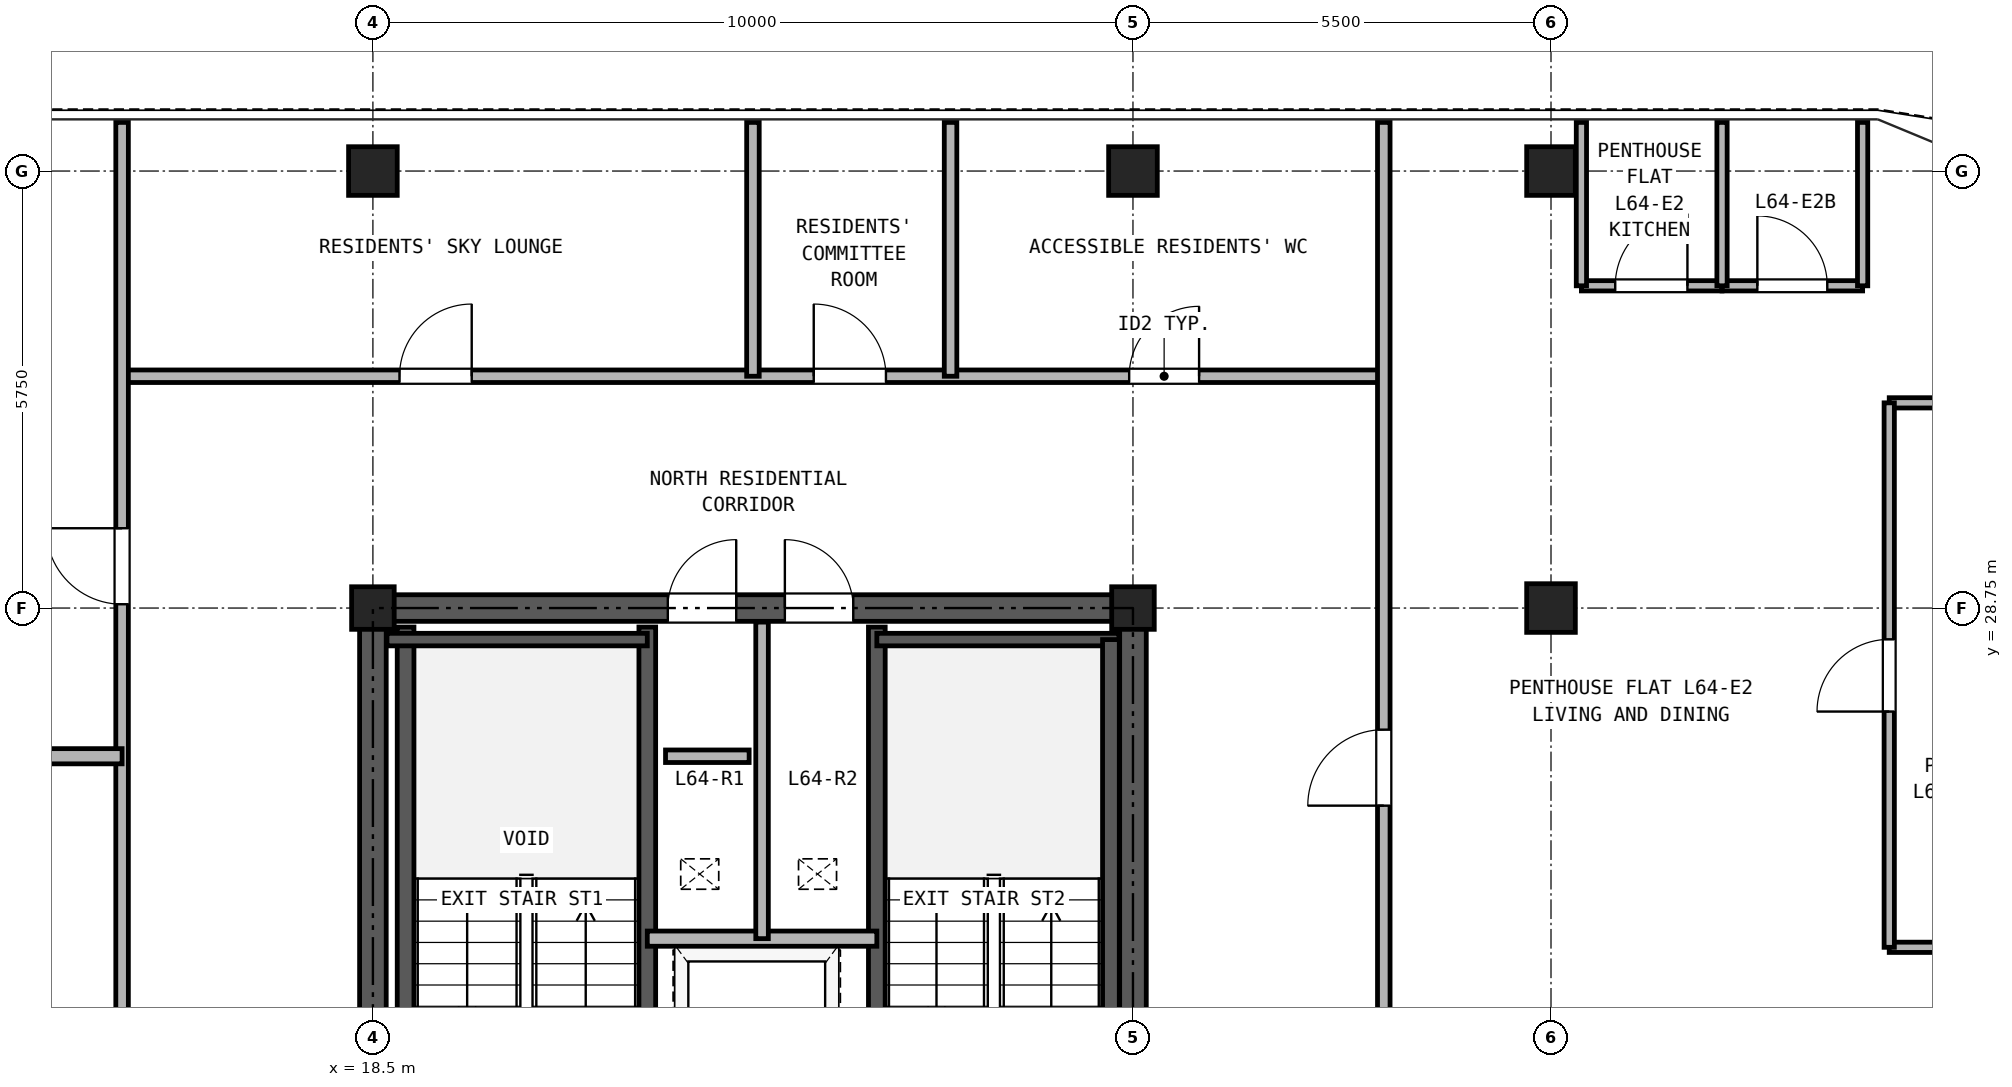
"""IFC4 building model, lengths in metres.
Left out: names, types, materials, properties, quantities, classifications, styles, units other than length and angle.
Written with IfcOpenShell. Run it as: python <this file> out.ifc"""

import sys

from ifc_helpers import new_model, si_unit, direction, frame, frame_2d, origin, origin_2d, place, context, subcontext, project, spatial, rectangle, hollow_rectangle, extrude, source, transform, mapped, element, fill, save


model = new_model("IFC4")
c1 = context("Model", 3, precision=1e-05, world=origin(), true_north=direction((0.0, 1.0)))
c2 = subcontext(c1, "Body", "Model", "MODEL_VIEW")
j1 = project(units=[si_unit("LENGTHUNIT", "METRE"), si_unit("PLANEANGLEUNIT", "RADIAN")], contexts=[c1])
p1 = place(None, origin())
s1 = spatial("IfcSite", under=j1, at=p1, CompositionType="ELEMENT")
p2 = place(p1, origin())
s2 = spatial("IfcBuilding", under=s1, at=p2, CompositionType="ELEMENT")
p3 = place(p2, frame((0.0, 0.0, 226.5)))
s3 = spatial("IfcBuildingStorey", under=s2, at=p3, CompositionType="ELEMENT", Elevation=226.5)
m1 = source(origin(), c2, "Body", "SweptSolid", [
    extrude(hollow_rectangle(XDim=0.64, YDim=0.64, WallThickness=0.035, at=origin_2d()), origin(), (0.0, 0.0, 1.0), 2.98),
])
for number, where, z_axis, x_axis in (
    (1, (18.5, 34.5, 0.0), (0.0, 0.0, 1.0), (1.0, 0.0, 0.0)),
    (2, (28.5, 34.5, 0.0), (0.0, 0.0, 1.0), (1.0, 0.0, 0.0)),
    (3, (34.0, 34.5, 0.0), (0.0, 0.0, 1.0), (1.0, 0.0, 0.0)),
):
    element("IfcColumn", number, at=place(p3, frame(where, z_axis=z_axis, x_axis=x_axis)), inside=s3, PredefinedType="COLUMN", context=c2, shape_type="MappedRepresentation", body=[
        mapped(m1, transform((0.0, 0.0, 0.0), x_axis=(1.0, 0.0, 0.0), y_axis=(0.0, 1.0, 0.0), z_axis=(0.0, 0.0, 1.0), scale=1.0)),
    ])
m2 = source(origin(), c2, "Body", "SweptSolid", [
    extrude(hollow_rectangle(XDim=0.56, YDim=0.56, WallThickness=0.03, at=origin_2d()), origin(), (0.0, 0.0, 1.0), 2.98),
])
for number, where, z_axis, x_axis in (
    (4, (18.5, 28.75, 0.0), (0.0, 0.0, 1.0), (1.0, 0.0, 0.0)),
    (5, (28.5, 28.75, 0.0), (0.0, 0.0, 1.0), (1.0, 0.0, 0.0)),
):
    element("IfcColumn", number, at=place(p3, frame(where, z_axis=z_axis, x_axis=x_axis)), inside=s3, PredefinedType="COLUMN", context=c2, shape_type="MappedRepresentation", body=[
        mapped(m2, transform((0.0, 0.0, 0.0), x_axis=(1.0, 0.0, 0.0), y_axis=(0.0, 1.0, 0.0), z_axis=(0.0, 0.0, 1.0), scale=1.0)),
    ])
p4 = place(p3, frame((34.0, 28.75, 0.0), z_axis=(0.0, 0.0, 1.0), x_axis=(1.0, 0.0, 0.0)))
e6 = element("IfcColumn", 6, at=p4, inside=s3, PredefinedType="COLUMN", context=c2, shape_type="MappedRepresentation", body=[
    mapped(m1, transform((0.0, 0.0, 0.0), x_axis=(1.0, 0.0, 0.0), y_axis=(0.0, 1.0, 0.0), z_axis=(0.0, 0.0, 1.0), scale=1.0)),
])
p5 = place(p3, frame((18.325, 28.75, 0.0), z_axis=(0.0, 0.0, 1.0), x_axis=(1.0, 0.0, 0.0)))
e7 = element("IfcWall", 7, at=p5, inside=s3, PredefinedType="SHEAR", context=c2, shape_type="SweptSolid", body=[
    extrude(rectangle(XDim=10.35, YDim=0.35, at=frame_2d((5.175, 0.0))), origin(), (0.0, 0.0, 1.0), 2.98),
])
p6 = place(p5, frame((4.055, 0.0, 0.0)))
e8 = element("IfcOpeningElement", 8, at=p6, cuts=e7, PredefinedType="OPENING", context=c2, shape_type="SweptSolid", body=[
    extrude(rectangle(XDim=0.9, YDim=2.05, at=frame_2d((0.45, 1.025))), frame((0.0, 0.185, 0.0), z_axis=(0.0, -1.0, 0.0), x_axis=(1.0, 0.0, 0.0)), (0.0, 0.0, 1.0), 0.37),
])
p7 = place(p5, frame((5.595, 0.0, 0.0)))
e9 = element("IfcOpeningElement", 9, at=p7, cuts=e7, PredefinedType="OPENING", context=c2, shape_type="SweptSolid", body=[
    extrude(rectangle(XDim=0.9, YDim=2.05, at=frame_2d((0.45, 1.025))), frame((0.0, 0.185, 0.0), z_axis=(0.0, -1.0, 0.0), x_axis=(1.0, 0.0, 0.0)), (0.0, 0.0, 1.0), 0.37),
])
p8 = place(p3, frame((18.5, 11.675, 0.0), z_axis=(0.0, 0.0, 1.0), x_axis=(0.0, 1.0, 0.0)))
e10 = element("IfcWall", 10, at=p8, inside=s3, PredefinedType="SHEAR", context=c2, shape_type="SweptSolid", body=[
    extrude(rectangle(XDim=16.9, YDim=0.35, at=frame_2d((8.45, 0.0))), origin(), (0.0, 0.0, 1.0), 2.98),
])
p9 = place(p8, frame((7.475, 0.0, 0.0)))
e11 = element("IfcOpeningElement", 11, at=p9, cuts=e10, PredefinedType="OPENING", context=c2, shape_type="SweptSolid", body=[
    extrude(rectangle(XDim=1.15, YDim=2.2, at=frame_2d((0.575, 1.1))), frame((0.0, 0.185, 0.0), z_axis=(0.0, -1.0, 0.0), x_axis=(1.0, 0.0, 0.0)), (0.0, 0.0, 1.0), 0.37),
])
p10 = place(p3, frame((28.5, 11.675, 0.0), z_axis=(0.0, 0.0, 1.0), x_axis=(0.0, 1.0, 0.0)))
e12 = element("IfcWall", 12, at=p10, inside=s3, PredefinedType="SHEAR", context=c2, shape_type="SweptSolid", body=[
    extrude(rectangle(XDim=16.9, YDim=0.35, at=frame_2d((8.45, 0.0))), origin(), (0.0, 0.0, 1.0), 2.98),
])
p11 = place(p10, frame((7.475, 0.0, 0.0)))
e13 = element("IfcOpeningElement", 13, at=p11, cuts=e12, PredefinedType="OPENING", context=c2, shape_type="SweptSolid", body=[
    extrude(rectangle(XDim=1.15, YDim=2.2, at=frame_2d((0.575, 1.1))), frame((0.0, 0.185, 0.0), z_axis=(0.0, -1.0, 0.0), x_axis=(1.0, 0.0, 0.0)), (0.0, 0.0, 1.0), 0.37),
])
for number, where, z_axis, x_axis in (
    (14, (18.93, 21.39, 0.0), (0.0, 0.0, 1.0), (0.0, 1.0, 0.0)),
    (15, (22.11, 21.39, 0.0), (0.0, 0.0, 1.0), (0.0, 1.0, 0.0)),
    (16, (25.13, 21.39, 0.0), (0.0, 0.0, 1.0), (0.0, 1.0, 0.0)),
):
    element("IfcWall", number, at=place(p3, frame(where, z_axis=z_axis, x_axis=x_axis)), inside=s3, PredefinedType="SOLIDWALL", context=c2, shape_type="SweptSolid", body=[
        extrude(rectangle(XDim=7.11, YDim=0.22, at=frame_2d((3.555, 0.0))), origin(), (0.0, 0.0, 1.0), 2.98),
    ])
p12 = place(p3, frame((18.685, 28.335, 0.0), z_axis=(0.0, 0.0, 1.0), x_axis=(1.0, 0.0, 0.0)))
e17 = element("IfcWall", 17, at=p12, inside=s3, PredefinedType="PARTITIONING", context=c2, shape_type="SweptSolid", body=[
    extrude(rectangle(XDim=3.425, YDim=0.165, at=frame_2d((1.712, 0.0))), origin(), (0.0, 0.0, 1.0), 2.98),
])
p13 = place(p3, frame((25.13, 28.335, 0.0), z_axis=(0.0, 0.0, 1.0), x_axis=(1.0, 0.0, 0.0)))
e18 = element("IfcWall", 18, at=p13, inside=s3, PredefinedType="PARTITIONING", context=c2, shape_type="SweptSolid", body=[
    extrude(rectangle(XDim=3.185, YDim=0.165, at=frame_2d((1.593, 0.0))), origin(), (0.0, 0.0, 1.0), 2.98),
])
p14 = place(p3, frame((28.21, 21.39, 0.0), z_axis=(0.0, 0.0, 1.0), x_axis=(0.0, 1.0, 0.0)))
e19 = element("IfcWall", 19, at=p14, inside=s3, PredefinedType="SOLIDWALL", context=c2, shape_type="SweptSolid", body=[
    extrude(rectangle(XDim=6.945, YDim=0.22, at=frame_2d((3.473, 0.0))), origin(), (0.0, 0.0, 1.0), 2.98),
])
p15 = place(p3, frame((22.11, 24.4, 0.0), z_axis=(0.0, 0.0, 1.0), x_axis=(1.0, 0.0, 0.0)))
e20 = element("IfcWall", 20, at=p15, inside=s3, PredefinedType="PARTITIONING", context=c2, shape_type="SweptSolid", body=[
    extrude(rectangle(XDim=3.02, YDim=0.2, at=frame_2d((1.51, 0.0))), origin(), (0.0, 0.0, 1.0), 2.98),
])
p16 = place(p3, frame((23.62, 24.4, 0.0), z_axis=(0.0, 0.0, 1.0), x_axis=(0.0, 1.0, 0.0)))
e21 = element("IfcWall", 21, at=p16, inside=s3, PredefinedType="PARTITIONING", context=c2, shape_type="SweptSolid", body=[
    extrude(rectangle(XDim=4.165, YDim=0.165, at=frame_2d((2.083, 0.0))), origin(), (0.0, 0.0, 1.0), 2.98),
])
p17 = place(p3, frame((15.2, 31.8, 0.0), z_axis=(0.0, 0.0, 1.0), x_axis=(1.0, 0.0, 0.0)))
e22 = element("IfcWall", 22, at=p17, inside=s3, PredefinedType="PARTITIONING", context=c2, shape_type="SweptSolid", body=[
    extrude(rectangle(XDim=16.6, YDim=0.165, at=frame_2d((8.3, 0.0))), origin(), (0.0, 0.0, 1.0), 2.655),
])
p18 = place(p17, frame((3.65, 0.0, 0.0)))
e23 = element("IfcOpeningElement", 23, at=p18, cuts=e22, PredefinedType="OPENING", context=c2, shape_type="SweptSolid", body=[
    extrude(rectangle(XDim=0.95, YDim=2.15, at=frame_2d((0.475, 1.075))), frame((0.0, 0.093, 0.0), z_axis=(0.0, -1.0, 0.0), x_axis=(1.0, 0.0, 0.0)), (0.0, 0.0, 1.0), 0.185),
])
p19 = place(p17, frame((9.1, 0.0, 0.0)))
e24 = element("IfcOpeningElement", 24, at=p19, cuts=e22, PredefinedType="OPENING", context=c2, shape_type="SweptSolid", body=[
    extrude(rectangle(XDim=0.95, YDim=2.15, at=frame_2d((0.475, 1.075))), frame((0.0, 0.093, 0.0), z_axis=(0.0, -1.0, 0.0), x_axis=(1.0, 0.0, 0.0)), (0.0, 0.0, 1.0), 0.185),
])
p20 = place(p17, frame((13.25, 0.0, 0.0)))
e25 = element("IfcOpeningElement", 25, at=p20, cuts=e22, PredefinedType="OPENING", context=c2, shape_type="SweptSolid", body=[
    extrude(rectangle(XDim=0.92, YDim=2.1, at=frame_2d((0.46, 1.05))), frame((0.0, 0.093, 0.0), z_axis=(0.0, -1.0, 0.0), x_axis=(1.0, 0.0, 0.0)), (0.0, 0.0, 1.0), 0.185),
])
p21 = place(p3, frame((15.2, 10.65, 0.0), z_axis=(0.0, 0.0, 1.0), x_axis=(0.0, 1.0, 0.0)))
e26 = element("IfcWall", 26, at=p21, inside=s3, PredefinedType="PARTITIONING", context=c2, shape_type="SweptSolid", body=[
    extrude(rectangle(XDim=24.49, YDim=0.165, at=frame_2d((12.245, 0.0))), origin(), (0.0, 0.0, 1.0), 2.98),
])
p22 = place(p21, frame((3.425, 0.0, 0.0)))
e27 = element("IfcOpeningElement", 27, at=p22, cuts=e26, PredefinedType="OPENING", context=c2, shape_type="SweptSolid", body=[
    extrude(rectangle(XDim=1.0, YDim=2.15, at=frame_2d((0.5, 1.075))), frame((0.0, 0.093, 0.0), z_axis=(0.0, -1.0, 0.0), x_axis=(1.0, 0.0, 0.0)), (0.0, 0.0, 1.0), 0.185),
])
p23 = place(p21, frame((11.5, 0.0, 0.0)))
e28 = element("IfcOpeningElement", 28, at=p23, cuts=e26, PredefinedType="OPENING", context=c2, shape_type="SweptSolid", body=[
    extrude(rectangle(XDim=1.0, YDim=2.15, at=frame_2d((0.5, 1.075))), frame((0.0, 0.093, 0.0), z_axis=(0.0, -1.0, 0.0), x_axis=(1.0, 0.0, 0.0)), (0.0, 0.0, 1.0), 0.185),
])
p24 = place(p21, frame((18.15, 0.0, 0.0)))
e29 = element("IfcOpeningElement", 29, at=p24, cuts=e26, PredefinedType="OPENING", context=c2, shape_type="SweptSolid", body=[
    extrude(rectangle(XDim=1.0, YDim=2.15, at=frame_2d((0.5, 1.075))), frame((0.0, 0.093, 0.0), z_axis=(0.0, -1.0, 0.0), x_axis=(1.0, 0.0, 0.0)), (0.0, 0.0, 1.0), 0.185),
])
p25 = place(p3, frame((31.8, 10.65, 0.0), z_axis=(0.0, 0.0, 1.0), x_axis=(0.0, 1.0, 0.0)))
e30 = element("IfcWall", 30, at=p25, inside=s3, PredefinedType="PARTITIONING", context=c2, shape_type="SweptSolid", body=[
    extrude(rectangle(XDim=24.49, YDim=0.165, at=frame_2d((12.245, 0.0))), origin(), (0.0, 0.0, 1.0), 2.98),
])
p26 = place(p25, frame((4.925, 0.0, 0.0)))
e31 = element("IfcOpeningElement", 31, at=p26, cuts=e30, PredefinedType="OPENING", context=c2, shape_type="SweptSolid", body=[
    extrude(rectangle(XDim=1.0, YDim=2.15, at=frame_2d((0.5, 1.075))), frame((0.0, 0.093, 0.0), z_axis=(0.0, -1.0, 0.0), x_axis=(1.0, 0.0, 0.0)), (0.0, 0.0, 1.0), 0.185),
])
p27 = place(p25, frame((15.5, 0.0, 0.0)))
e32 = element("IfcOpeningElement", 32, at=p27, cuts=e30, PredefinedType="OPENING", context=c2, shape_type="SweptSolid", body=[
    extrude(rectangle(XDim=1.0, YDim=2.15, at=frame_2d((0.5, 1.075))), frame((0.0, 0.093, 0.0), z_axis=(0.0, -1.0, 0.0), x_axis=(1.0, 0.0, 0.0)), (0.0, 0.0, 1.0), 0.185),
])
p28 = place(p3, frame((5.36, 26.8, 0.0), z_axis=(0.0, 0.0, 1.0), x_axis=(1.0, 0.0, 0.0)))
e33 = element("IfcWall", 33, at=p28, inside=s3, PredefinedType="PARTITIONING", context=c2, shape_type="SweptSolid", body=[
    extrude(rectangle(XDim=9.84, YDim=0.2, at=frame_2d((4.92, 0.0))), origin(), (0.0, 0.0, 1.0), 2.98),
])
p29 = place(p3, frame((34.4, 32.99, 0.0), z_axis=(0.0, 0.0, 1.0), x_axis=(1.0, 0.0, 0.0)))
e34 = element("IfcWall", 34, at=p29, inside=s3, PredefinedType="PARTITIONING", context=c2, shape_type="SweptSolid", body=[
    extrude(rectangle(XDim=1.85, YDim=0.135, at=frame_2d((0.925, 0.0))), origin(), (0.0, 0.0, 1.0), 2.98),
])
p30 = place(p29, frame((0.445, 0.0, 0.0)))
e35 = element("IfcOpeningElement", 35, at=p30, cuts=e34, PredefinedType="OPENING", context=c2, shape_type="SweptSolid", body=[
    extrude(rectangle(XDim=0.95, YDim=2.15, at=frame_2d((0.475, 1.075))), frame((0.0, 0.077, 0.0), z_axis=(0.0, -1.0, 0.0), x_axis=(1.0, 0.0, 0.0)), (0.0, 0.0, 1.0), 0.155),
])
p31 = place(p3, frame((36.25, 32.99, 0.0), z_axis=(0.0, 0.0, 1.0), x_axis=(1.0, 0.0, 0.0)))
e36 = element("IfcWall", 36, at=p31, inside=s3, PredefinedType="PARTITIONING", context=c2, shape_type="SweptSolid", body=[
    extrude(rectangle(XDim=1.85, YDim=0.135, at=frame_2d((0.925, 0.0))), origin(), (0.0, 0.0, 1.0), 2.98),
])
p32 = place(p31, frame((0.465, 0.0, 0.0)))
e37 = element("IfcOpeningElement", 37, at=p32, cuts=e36, PredefinedType="OPENING", context=c2, shape_type="SweptSolid", body=[
    extrude(rectangle(XDim=0.92, YDim=2.1, at=frame_2d((0.46, 1.05))), frame((0.0, 0.077, 0.0), z_axis=(0.0, -1.0, 0.0), x_axis=(1.0, 0.0, 0.0)), (0.0, 0.0, 1.0), 0.155),
])
for number, where, z_axis, x_axis in (
    (38, (34.4, 32.99, 0.0), (0.0, 0.0, 1.0), (0.0, 1.0, 0.0)),
    (39, (36.25, 32.99, 0.0), (0.0, 0.0, 1.0), (0.0, 1.0, 0.0)),
    (40, (38.1, 32.99, 0.0), (0.0, 0.0, 1.0), (0.0, 1.0, 0.0)),
):
    element("IfcWall", number, at=place(p3, frame(where, z_axis=z_axis, x_axis=x_axis)), inside=s3, PredefinedType="PARTITIONING", context=c2, shape_type="SweptSolid", body=[
        extrude(rectangle(XDim=2.15, YDim=0.135, at=frame_2d((1.075, 0.0))), origin(), (0.0, 0.0, 1.0), 2.98),
    ])
for number, where, z_axis, x_axis in (
    (41, (38.45, 24.286, 0.0), (0.0, 0.0, 1.0), (1.0, 0.0, 0.0)),
    (42, (38.45, 31.45, 0.0), (0.0, 0.0, 1.0), (1.0, 0.0, 0.0)),
):
    element("IfcWall", number, at=place(p3, frame(where, z_axis=z_axis, x_axis=x_axis)), inside=s3, PredefinedType="PARTITIONING", context=c2, shape_type="SweptSolid", body=[
        extrude(rectangle(XDim=3.19, YDim=0.135, at=frame_2d((1.595, 0.0))), origin(), (0.0, 0.0, 1.0), 2.98),
    ])
p33 = place(p3, frame((38.45, 24.286, 0.0), z_axis=(0.0, 0.0, 1.0), x_axis=(0.0, 1.0, 0.0)))
e43 = element("IfcWall", 43, at=p33, inside=s3, PredefinedType="PARTITIONING", context=c2, shape_type="SweptSolid", body=[
    extrude(rectangle(XDim=7.164, YDim=0.135, at=frame_2d((3.582, 0.0))), origin(), (0.0, 0.0, 1.0), 2.98),
])
p34 = place(p33, frame((3.102, 0.0, 0.0)))
e44 = element("IfcOpeningElement", 44, at=p34, cuts=e43, PredefinedType="OPENING", context=c2, shape_type="SweptSolid", body=[
    extrude(rectangle(XDim=0.95, YDim=2.15, at=frame_2d((0.475, 1.075))), frame((0.0, 0.077, 0.0), z_axis=(0.0, -1.0, 0.0), x_axis=(1.0, 0.0, 0.0)), (0.0, 0.0, 1.0), 0.155),
])
for number, where, z_axis, x_axis in (
    (45, (23.5, 31.8, 0.0), (0.0, 0.0, 1.0), (0.0, 1.0, 0.0)),
    (46, (26.1, 31.8, 0.0), (0.0, 0.0, 1.0), (0.0, 1.0, 0.0)),
):
    element("IfcWall", number, at=place(p3, frame(where, z_axis=z_axis, x_axis=x_axis)), inside=s3, PredefinedType="PARTITIONING", context=c2, shape_type="SweptSolid", body=[
        extrude(rectangle(XDim=3.34, YDim=0.165, at=frame_2d((1.67, 0.0))), origin(), (0.0, 0.0, 1.0), 2.98),
    ])
p35 = place(p3, frame((22.35, 26.8, 0.0), z_axis=(0.0, 0.0, 1.0), x_axis=(1.0, 0.0, 0.0)))
e47 = element("IfcWall", 47, at=p35, inside=s3, PredefinedType="PARTITIONING", context=c2, shape_type="SweptSolid", body=[
    extrude(rectangle(XDim=1.1, YDim=0.165, at=frame_2d((0.55, 0.0))), origin(), (0.0, 0.0, 1.0), 2.98),
])
p36 = place(p6, origin())
e48 = element("IfcDoor", 48, at=p36, inside=s3, OperationType="SINGLE_SWING_RIGHT", PredefinedType="DOOR", context=c2, shape_type="SweptSolid", body=[
    extrude(rectangle(XDim=0.9, YDim=2.05, at=frame_2d((0.45, 1.025))), frame((0.0, 0.025, 0.0), z_axis=(0.0, -1.0, 0.0), x_axis=(1.0, 0.0, 0.0)), (0.0, 0.0, 1.0), 0.05),
])
fill(e8, e48)
p37 = place(p7, origin())
e49 = element("IfcDoor", 49, at=p37, inside=s3, OperationType="SINGLE_SWING_LEFT", PredefinedType="DOOR", context=c2, shape_type="SweptSolid", body=[
    extrude(rectangle(XDim=0.9, YDim=2.05, at=frame_2d((0.45, 1.025))), frame((0.0, 0.025, 0.0), z_axis=(0.0, -1.0, 0.0), x_axis=(1.0, 0.0, 0.0)), (0.0, 0.0, 1.0), 0.05),
])
fill(e9, e49)
p38 = place(p24, origin())
e50 = element("IfcDoor", 50, at=p38, inside=s3, OperationType="SINGLE_SWING_RIGHT", PredefinedType="DOOR", context=c2, shape_type="SweptSolid", body=[
    extrude(rectangle(XDim=1.0, YDim=2.15, at=frame_2d((0.5, 1.075))), frame((0.0, 0.025, 0.0), z_axis=(0.0, -1.0, 0.0), x_axis=(1.0, 0.0, 0.0)), (0.0, 0.0, 1.0), 0.05),
])
fill(e29, e50)
p39 = place(p30, frame((0.95, 0.0, 0.0), z_axis=(0.0, 0.0, 1.0), x_axis=(-1.0, 0.0, 0.0)))
e51 = element("IfcDoor", 51, at=p39, inside=s3, OperationType="SINGLE_SWING_RIGHT", PredefinedType="DOOR", context=c2, shape_type="SweptSolid", body=[
    extrude(rectangle(XDim=0.95, YDim=2.15, at=frame_2d((0.475, 1.075))), frame((0.0, 0.025, 0.0), z_axis=(0.0, -1.0, 0.0), x_axis=(1.0, 0.0, 0.0)), (0.0, 0.0, 1.0), 0.05),
])
fill(e35, e51)
p40 = place(p32, frame((0.92, 0.0, 0.0), z_axis=(0.0, 0.0, 1.0), x_axis=(-1.0, 0.0, 0.0)))
e52 = element("IfcDoor", 52, at=p40, inside=s3, OperationType="SINGLE_SWING_LEFT", PredefinedType="DOOR", context=c2, shape_type="SweptSolid", body=[
    extrude(rectangle(XDim=0.92, YDim=2.1, at=frame_2d((0.46, 1.05))), frame((0.0, 0.025, 0.0), z_axis=(0.0, -1.0, 0.0), x_axis=(1.0, 0.0, 0.0)), (0.0, 0.0, 1.0), 0.05),
])
fill(e37, e52)
p41 = place(p34, frame((0.95, 0.0, 0.0), z_axis=(0.0, 0.0, 1.0), x_axis=(-1.0, 0.0, 0.0)))
e53 = element("IfcDoor", 53, at=p41, inside=s3, OperationType="SINGLE_SWING_LEFT", PredefinedType="DOOR", context=c2, shape_type="SweptSolid", body=[
    extrude(rectangle(XDim=0.95, YDim=2.15, at=frame_2d((0.475, 1.075))), frame((0.0, 0.025, 0.0), z_axis=(0.0, -1.0, 0.0), x_axis=(1.0, 0.0, 0.0)), (0.0, 0.0, 1.0), 0.05),
])
fill(e44, e53)
p42 = place(p27, frame((1.0, 0.0, 0.0), z_axis=(0.0, 0.0, 1.0), x_axis=(-1.0, 0.0, 0.0)))
e54 = element("IfcDoor", 54, at=p42, inside=s3, OperationType="SINGLE_SWING_LEFT", PredefinedType="DOOR", context=c2, shape_type="SweptSolid", body=[
    extrude(rectangle(XDim=1.0, YDim=2.15, at=frame_2d((0.5, 1.075))), frame((0.0, 0.025, 0.0), z_axis=(0.0, -1.0, 0.0), x_axis=(1.0, 0.0, 0.0)), (0.0, 0.0, 1.0), 0.05),
])
fill(e32, e54)
p43 = place(p18, origin())
e55 = element("IfcDoor", 55, at=p43, inside=s3, OperationType="SINGLE_SWING_RIGHT", PredefinedType="DOOR", context=c2, shape_type="SweptSolid", body=[
    extrude(rectangle(XDim=0.95, YDim=2.15, at=frame_2d((0.475, 1.075))), frame((0.0, 0.025, 0.0), z_axis=(0.0, -1.0, 0.0), x_axis=(1.0, 0.0, 0.0)), (0.0, 0.0, 1.0), 0.05),
])
fill(e23, e55)
p44 = place(p19, origin())
e56 = element("IfcDoor", 56, at=p44, inside=s3, OperationType="SINGLE_SWING_LEFT", PredefinedType="DOOR", context=c2, shape_type="SweptSolid", body=[
    extrude(rectangle(XDim=0.95, YDim=2.15, at=frame_2d((0.475, 1.075))), frame((0.0, 0.025, 0.0), z_axis=(0.0, -1.0, 0.0), x_axis=(1.0, 0.0, 0.0)), (0.0, 0.0, 1.0), 0.05),
])
fill(e24, e56)
p45 = place(p20, origin())
e57 = element("IfcDoor", 57, at=p45, inside=s3, OperationType="SINGLE_SWING_RIGHT", PredefinedType="DOOR", context=c2, shape_type="SweptSolid", body=[
    extrude(rectangle(XDim=0.92, YDim=2.1, at=frame_2d((0.46, 1.05))), frame((0.0, 0.025, 0.0), z_axis=(0.0, -1.0, 0.0), x_axis=(1.0, 0.0, 0.0)), (0.0, 0.0, 1.0), 0.05),
])
fill(e25, e57)
save(model, sys.argv[1])
